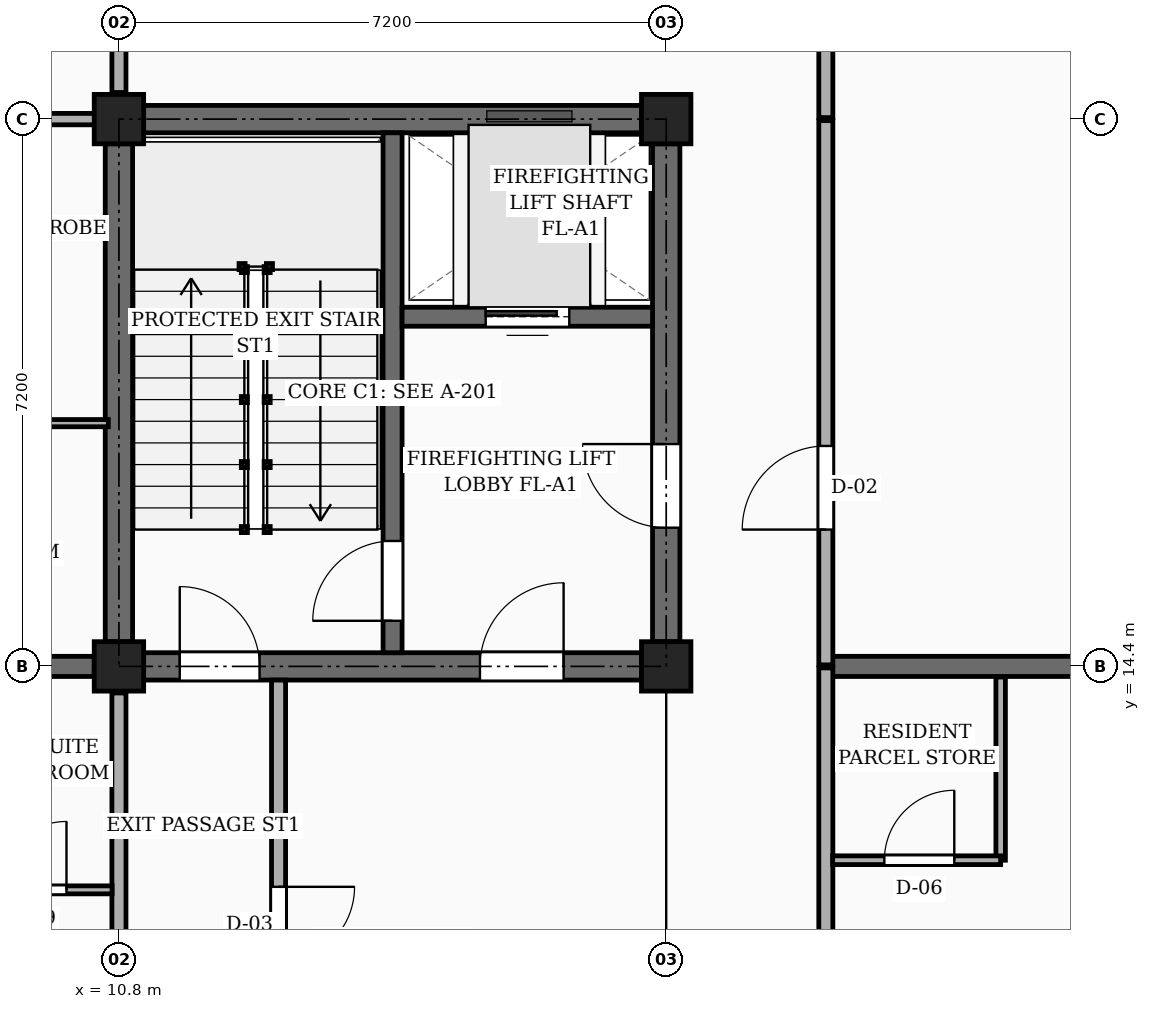
"""IFC4 building model, lengths in metres.
Left out: names, types, materials, properties, quantities, classifications, styles, units other than length and angle.
Written with IfcOpenShell. Run it as: python <this file> out.ifc"""

import sys

from ifc_helpers import new_model, si_unit, direction, frame, frame_2d, origin, origin_2d, place, context, subcontext, project, spatial, rectangle, extrude, element, fill, save


model = new_model("IFC4")
c1 = context("Model", 3, precision=1e-05, world=origin(), true_north=direction((0.0, 1.0)))
c2 = subcontext(c1, "Body", "Model", "MODEL_VIEW")
j1 = project(units=[si_unit("LENGTHUNIT", "METRE"), si_unit("PLANEANGLEUNIT", "RADIAN")], contexts=[c1])
p1 = place(None, origin())
s1 = spatial("IfcSite", under=j1, at=p1, CompositionType="ELEMENT")
p2 = place(p1, origin())
s2 = spatial("IfcBuilding", under=s1, at=p2, CompositionType="ELEMENT")
p3 = place(p2, origin())
s3 = spatial("IfcBuildingStorey", under=s2, at=p3, CompositionType="ELEMENT", Elevation=0.0)
for number, where, z_axis, x_axis in (
    (1, (10.8, 14.4, 0.0), (0.0, 0.0, 1.0), (1.0, 0.0, 0.0)),
    (2, (10.8, 21.6, 0.0), (0.0, 0.0, 1.0), (1.0, 0.0, 0.0)),
    (3, (18.0, 14.4, 0.0), (0.0, 0.0, 1.0), (1.0, 0.0, 0.0)),
    (4, (18.0, 21.6, 0.0), (0.0, 0.0, 1.0), (1.0, 0.0, 0.0)),
):
    element("IfcColumn", number, at=place(p3, frame(where, z_axis=z_axis, x_axis=x_axis)), inside=s3, PredefinedType="COLUMN", context=c2, shape_type="SweptSolid", body=[
        extrude(rectangle(XDim=0.65, YDim=0.65, at=origin_2d()), origin(), (0.0, 0.0, 1.0), 4.5),
    ])
p4 = place(p3, frame((3.9, 14.4, 0.0), z_axis=(0.0, 0.0, 1.0), x_axis=(1.0, 0.0, 0.0)))
e5 = element("IfcWall", 5, at=p4, inside=s3, PredefinedType="SOLIDWALL", context=c2, shape_type="SweptSolid", body=[
    extrude(rectangle(XDim=6.575, YDim=0.265, at=frame_2d((3.288, 0.0))), origin(), (0.0, 0.0, 1.0), 3.52),
])
p5 = place(p4, frame((1.35, 0.0, 0.0)))
e6 = element("IfcOpeningElement", 6, at=p5, cuts=e5, PredefinedType="OPENING", context=c2, shape_type="SweptSolid", body=[
    extrude(rectangle(XDim=0.98, YDim=2.12, at=frame_2d((0.49, 1.06))), frame((0.0, 0.143, 0.0), z_axis=(0.0, -1.0, 0.0), x_axis=(1.0, 0.0, 0.0)), (0.0, 0.0, 1.0), 0.285),
])
p6 = place(p3, frame((20.1, 14.4, 0.0), z_axis=(0.0, 0.0, 1.0), x_axis=(1.0, 0.0, 0.0)))
e7 = element("IfcWall", 7, at=p6, inside=s3, PredefinedType="SOLIDWALL", context=c2, shape_type="SweptSolid", body=[
    extrude(rectangle(XDim=12.0, YDim=0.265, at=frame_2d((6.0, 0.0))), origin(), (0.0, 0.0, 1.0), 3.52),
])
p7 = place(p3, frame((10.8, 14.725, 0.0), z_axis=(0.0, 0.0, 1.0), x_axis=(0.0, 1.0, 0.0)))
e8 = element("IfcWall", 8, at=p7, inside=s3, PredefinedType="SHEAR", context=c2, shape_type="SweptSolid", body=[
    extrude(rectangle(XDim=6.55, YDim=0.36, at=frame_2d((3.275, 0.0))), origin(), (0.0, 0.0, 1.0), 4.22),
])
p8 = place(p3, frame((11.125, 21.6, 0.0), z_axis=(0.0, 0.0, 1.0), x_axis=(1.0, 0.0, 0.0)))
e9 = element("IfcWall", 9, at=p8, inside=s3, PredefinedType="SHEAR", context=c2, shape_type="SweptSolid", body=[
    extrude(rectangle(XDim=6.55, YDim=0.36, at=frame_2d((3.275, 0.0))), origin(), (0.0, 0.0, 1.0), 4.22),
])
p9 = place(p3, frame((18.0, 14.725, 0.0), z_axis=(0.0, 0.0, 1.0), x_axis=(0.0, 1.0, 0.0)))
e10 = element("IfcWall", 10, at=p9, inside=s3, PredefinedType="SHEAR", context=c2, shape_type="SweptSolid", body=[
    extrude(rectangle(XDim=6.55, YDim=0.36, at=frame_2d((3.275, 0.0))), origin(), (0.0, 0.0, 1.0), 4.22),
])
p10 = place(p9, frame((1.5, 0.0, 0.0)))
e11 = element("IfcOpeningElement", 11, at=p10, cuts=e10, PredefinedType="OPENING", context=c2, shape_type="SweptSolid", body=[
    extrude(rectangle(XDim=1.1, YDim=2.15, at=frame_2d((0.55, 1.075))), frame((0.0, 0.19, 0.0), z_axis=(0.0, -1.0, 0.0), x_axis=(1.0, 0.0, 0.0)), (0.0, 0.0, 1.0), 0.38),
])
p11 = place(p3, frame((11.125, 14.4, 0.0), z_axis=(0.0, 0.0, 1.0), x_axis=(1.0, 0.0, 0.0)))
e12 = element("IfcWall", 12, at=p11, inside=s3, PredefinedType="SHEAR", context=c2, shape_type="SweptSolid", body=[
    extrude(rectangle(XDim=6.55, YDim=0.36, at=frame_2d((3.275, 0.0))), origin(), (0.0, 0.0, 1.0), 4.22),
])
p12 = place(p11, frame((4.425, 0.0, 0.0)))
e13 = element("IfcOpeningElement", 13, at=p12, cuts=e12, PredefinedType="OPENING", context=c2, shape_type="SweptSolid", body=[
    extrude(rectangle(XDim=1.1, YDim=2.15, at=frame_2d((0.55, 1.075))), frame((0.0, 0.19, 0.0), z_axis=(0.0, -1.0, 0.0), x_axis=(1.0, 0.0, 0.0)), (0.0, 0.0, 1.0), 0.38),
])
p13 = place(p11, frame((0.475, 0.0, 0.0)))
e14 = element("IfcOpeningElement", 14, at=p13, cuts=e12, PredefinedType="OPENING", context=c2, shape_type="SweptSolid", body=[
    extrude(rectangle(XDim=1.05, YDim=2.15, at=frame_2d((0.525, 1.075))), frame((0.0, 0.19, 0.0), z_axis=(0.0, -1.0, 0.0), x_axis=(1.0, 0.0, 0.0)), (0.0, 0.0, 1.0), 0.38),
])
p14 = place(p3, frame((14.4, 14.58, 0.0), z_axis=(0.0, 0.0, 1.0), x_axis=(0.0, 1.0, 0.0)))
e15 = element("IfcWall", 15, at=p14, inside=s3, PredefinedType="SHEAR", context=c2, shape_type="SweptSolid", body=[
    extrude(rectangle(XDim=6.84, YDim=0.25, at=frame_2d((3.42, 0.0))), origin(), (0.0, 0.0, 1.0), 4.22),
])
p15 = place(p14, frame((0.42, 0.0, 0.0)))
e16 = element("IfcOpeningElement", 16, at=p15, cuts=e15, PredefinedType="OPENING", context=c2, shape_type="SweptSolid", body=[
    extrude(rectangle(XDim=1.05, YDim=2.15, at=frame_2d((0.525, 1.075))), frame((0.0, 0.135, 0.0), z_axis=(0.0, -1.0, 0.0), x_axis=(1.0, 0.0, 0.0)), (0.0, 0.0, 1.0), 0.27),
])
p16 = place(p3, frame((14.525, 19.0, 0.0), z_axis=(0.0, 0.0, 1.0), x_axis=(1.0, 0.0, 0.0)))
e17 = element("IfcWall", 17, at=p16, inside=s3, PredefinedType="SHEAR", context=c2, shape_type="SweptSolid", body=[
    extrude(rectangle(XDim=3.295, YDim=0.25, at=frame_2d((1.647, 0.0))), origin(), (0.0, 0.0, 1.0), 4.22),
])
p17 = place(p16, frame((1.1, 0.0, 0.0)))
e18 = element("IfcOpeningElement", 18, at=p17, cuts=e17, PredefinedType="OPENING", context=c2, shape_type="SweptSolid", body=[
    extrude(rectangle(XDim=1.1, YDim=2.2, at=frame_2d((0.55, 1.1))), frame((0.0, 0.135, 0.0), z_axis=(0.0, -1.0, 0.0), x_axis=(1.0, 0.0, 0.0)), (0.0, 0.0, 1.0), 0.27),
])
p18 = place(p3, frame((20.1, 7.375, 0.0), z_axis=(0.0, 0.0, 1.0), x_axis=(0.0, 1.0, 0.0)))
e19 = element("IfcWall", 19, at=p18, inside=s3, PredefinedType="PARTITIONING", context=c2, shape_type="SweptSolid", body=[
    extrude(rectangle(XDim=7.005, YDim=0.185, at=frame_2d((3.502, 0.0))), origin(), (0.0, 0.0, 1.0), 3.655),
])
p19 = place(p18, frame((1.375, 0.0, 0.0)))
e20 = element("IfcOpeningElement", 20, at=p19, cuts=e19, PredefinedType="OPENING", context=c2, shape_type="SweptSolid", body=[
    extrude(rectangle(XDim=1.1, YDim=2.15, at=frame_2d((0.55, 1.075))), frame((0.0, 0.103, 0.0), z_axis=(0.0, -1.0, 0.0), x_axis=(1.0, 0.0, 0.0)), (0.0, 0.0, 1.0), 0.205),
])
p20 = place(p3, frame((20.1, 14.42, 0.0), z_axis=(0.0, 0.0, 1.0), x_axis=(0.0, 1.0, 0.0)))
e21 = element("IfcWall", 21, at=p20, inside=s3, PredefinedType="PARTITIONING", context=c2, shape_type="SweptSolid", body=[
    extrude(rectangle(XDim=7.16, YDim=0.185, at=frame_2d((3.58, 0.0))), origin(), (0.0, 0.0, 1.0), 3.655),
])
p21 = place(p20, frame((1.78, 0.0, 0.0)))
e22 = element("IfcOpeningElement", 22, at=p21, cuts=e21, PredefinedType="OPENING", context=c2, shape_type="SweptSolid", body=[
    extrude(rectangle(XDim=1.1, YDim=2.15, at=frame_2d((0.55, 1.075))), frame((0.0, 0.103, 0.0), z_axis=(0.0, -1.0, 0.0), x_axis=(1.0, 0.0, 0.0)), (0.0, 0.0, 1.0), 0.205),
])
p22 = place(p3, frame((20.1, 21.62, 0.0), z_axis=(0.0, 0.0, 1.0), x_axis=(0.0, 1.0, 0.0)))
e23 = element("IfcWall", 23, at=p22, inside=s3, PredefinedType="PARTITIONING", context=c2, shape_type="SweptSolid", body=[
    extrude(rectangle(XDim=7.16, YDim=0.185, at=frame_2d((3.58, 0.0))), origin(), (0.0, 0.0, 1.0), 3.655),
])
p23 = place(p22, frame((1.78, 0.0, 0.0)))
e24 = element("IfcOpeningElement", 24, at=p23, cuts=e23, PredefinedType="OPENING", context=c2, shape_type="SweptSolid", body=[
    extrude(rectangle(XDim=1.1, YDim=2.15, at=frame_2d((0.55, 1.075))), frame((0.0, 0.103, 0.0), z_axis=(0.0, -1.0, 0.0), x_axis=(1.0, 0.0, 0.0)), (0.0, 0.0, 1.0), 0.205),
])
p24 = place(p3, frame((10.8, 7.55, 0.0), z_axis=(0.0, 0.0, 1.0), x_axis=(0.0, 1.0, 0.0)))
e25 = element("IfcWall", 25, at=p24, inside=s3, PredefinedType="PARTITIONING", context=c2, shape_type="SweptSolid", body=[
    extrude(rectangle(XDim=6.5, YDim=0.185, at=frame_2d((3.25, 0.0))), origin(), (0.0, 0.0, 1.0), 3.47),
])
p25 = place(p24, frame((1.0, 0.0, 0.0)))
e26 = element("IfcOpeningElement", 26, at=p25, cuts=e25, PredefinedType="OPENING", context=c2, shape_type="SweptSolid", body=[
    extrude(rectangle(XDim=0.94, YDim=2.12, at=frame_2d((0.47, 1.06))), frame((0.0, 0.103, 0.0), z_axis=(0.0, -1.0, 0.0), x_axis=(1.0, 0.0, 0.0)), (0.0, 0.0, 1.0), 0.205),
])
p26 = place(p3, frame((10.8, 21.95, 0.0), z_axis=(0.0, 0.0, 1.0), x_axis=(0.0, 1.0, 0.0)))
e27 = element("IfcWall", 27, at=p26, inside=s3, PredefinedType="PARTITIONING", context=c2, shape_type="SweptSolid", body=[
    extrude(rectangle(XDim=6.5, YDim=0.185, at=frame_2d((3.25, 0.0))), origin(), (0.0, 0.0, 1.0), 3.47),
])
p27 = place(p26, frame((1.0, 0.0, 0.0)))
e28 = element("IfcOpeningElement", 28, at=p27, cuts=e27, PredefinedType="OPENING", context=c2, shape_type="SweptSolid", body=[
    extrude(rectangle(XDim=1.14, YDim=2.18, at=frame_2d((0.57, 1.09))), frame((0.0, 0.103, 0.0), z_axis=(0.0, -1.0, 0.0), x_axis=(1.0, 0.0, 0.0)), (0.0, 0.0, 1.0), 0.205),
])
p28 = place(p3, frame((3.775, 21.6, 0.0), z_axis=(0.0, 0.0, 1.0), x_axis=(1.0, 0.0, 0.0)))
e29 = element("IfcWall", 29, at=p28, inside=s3, PredefinedType="PARTITIONING", context=c2, shape_type="SweptSolid", body=[
    extrude(rectangle(XDim=6.885, YDim=0.15, at=frame_2d((3.442, 0.0))), origin(), (0.0, 0.0, 1.0), 3.27),
])
p29 = place(p3, frame((8.61, 11.46, 0.0), z_axis=(0.0, 0.0, 1.0), x_axis=(1.0, 0.0, 0.0)))
e30 = element("IfcWall", 30, at=p29, inside=s3, PredefinedType="PARTITIONING", context=c2, shape_type="SweptSolid", body=[
    extrude(rectangle(XDim=2.1, YDim=0.105, at=frame_2d((1.05, 0.0))), origin(), (0.0, 0.0, 1.0), 3.655),
])
p30 = place(p29, frame((0.6, 0.0, 0.0)))
e31 = element("IfcOpeningElement", 31, at=p30, cuts=e30, PredefinedType="OPENING", context=c2, shape_type="SweptSolid", body=[
    extrude(rectangle(XDim=0.9, YDim=2.05, at=frame_2d((0.45, 1.025))), frame((0.0, 0.062, 0.0), z_axis=(0.0, -1.0, 0.0), x_axis=(1.0, 0.0, 0.0)), (0.0, 0.0, 1.0), 0.125),
])
p31 = place(p3, frame((22.4, 11.85, 0.0), z_axis=(0.0, 0.0, 1.0), x_axis=(0.0, 1.0, 0.0)))
e32 = element("IfcWall", 32, at=p31, inside=s3, PredefinedType="PARTITIONING", context=c2, shape_type="SweptSolid", body=[
    extrude(rectangle(XDim=2.41, YDim=0.125, at=frame_2d((1.205, 0.0))), origin(), (0.0, 0.0, 1.0), 3.655),
])
p32 = place(p3, frame((20.19, 11.85, 0.0), z_axis=(0.0, 0.0, 1.0), x_axis=(1.0, 0.0, 0.0)))
e33 = element("IfcWall", 33, at=p32, inside=s3, PredefinedType="PARTITIONING", context=c2, shape_type="SweptSolid", body=[
    extrude(rectangle(XDim=2.21, YDim=0.115, at=frame_2d((1.105, 0.0))), origin(), (0.0, 0.0, 1.0), 3.655),
])
p33 = place(p32, frame((0.68, 0.0, 0.0)))
e34 = element("IfcOpeningElement", 34, at=p33, cuts=e33, PredefinedType="OPENING", context=c2, shape_type="SweptSolid", body=[
    extrude(rectangle(XDim=0.92, YDim=2.1, at=frame_2d((0.46, 1.05))), frame((0.0, 0.067, 0.0), z_axis=(0.0, -1.0, 0.0), x_axis=(1.0, 0.0, 0.0)), (0.0, 0.0, 1.0), 0.135),
])
p34 = place(p3, frame((7.27, 17.6, 0.0), z_axis=(0.0, 0.0, 1.0), x_axis=(1.0, 0.0, 0.0)))
e35 = element("IfcWall", 35, at=p34, inside=s3, PredefinedType="PARTITIONING", context=c2, shape_type="SweptSolid", body=[
    extrude(rectangle(XDim=3.39, YDim=0.095, at=frame_2d((1.695, 0.0))), origin(), (0.0, 0.0, 1.0), 3.655),
])
p35 = place(p3, frame((12.9, 14.22, 0.0), z_axis=(0.0, 0.0, 1.0), x_axis=(0.0, -1.0, 0.0)))
e36 = element("IfcWall", 36, at=p35, inside=s3, PredefinedType="PARTITIONING", context=c2, shape_type="SweptSolid", body=[
    extrude(rectangle(XDim=6.86, YDim=0.185, at=frame_2d((3.43, 0.0))), origin(), (0.0, 0.0, 1.0), 3.655),
])
p36 = place(p35, frame((2.72, 0.0, 0.0)))
e37 = element("IfcOpeningElement", 37, at=p36, cuts=e36, PredefinedType="OPENING", context=c2, shape_type="SweptSolid", body=[
    extrude(rectangle(XDim=1.0, YDim=2.15, at=frame_2d((0.5, 1.075))), frame((0.0, 0.103, 0.0), z_axis=(0.0, -1.0, 0.0), x_axis=(1.0, 0.0, 0.0)), (0.0, 0.0, 1.0), 0.205),
])
p37 = place(p10, frame((1.1, 0.0, 0.0), z_axis=(0.0, 0.0, 1.0), x_axis=(-1.0, 0.0, 0.0)))
e38 = element("IfcDoor", 38, at=p37, inside=s3, OperationType="SINGLE_SWING_RIGHT", PredefinedType="DOOR", context=c2, shape_type="SweptSolid", body=[
    extrude(rectangle(XDim=1.1, YDim=2.15, at=frame_2d((0.55, 1.075))), frame((0.0, 0.025, 0.0), z_axis=(0.0, -1.0, 0.0), x_axis=(1.0, 0.0, 0.0)), (0.0, 0.0, 1.0), 0.05),
])
fill(e11, e38)
p38 = place(p12, frame((1.1, 0.0, 0.0), z_axis=(0.0, 0.0, 1.0), x_axis=(-1.0, 0.0, 0.0)))
e39 = element("IfcDoor", 39, at=p38, inside=s3, OperationType="SINGLE_SWING_RIGHT", PredefinedType="DOOR", context=c2, shape_type="SweptSolid", body=[
    extrude(rectangle(XDim=1.1, YDim=2.15, at=frame_2d((0.55, 1.075))), frame((0.0, 0.025, 0.0), z_axis=(0.0, -1.0, 0.0), x_axis=(1.0, 0.0, 0.0)), (0.0, 0.0, 1.0), 0.05),
])
fill(e13, e39)
p39 = place(p15, frame((1.05, 0.0, 0.0), z_axis=(0.0, 0.0, 1.0), x_axis=(-1.0, 0.0, 0.0)))
e40 = element("IfcDoor", 40, at=p39, inside=s3, OperationType="SINGLE_SWING_LEFT", PredefinedType="DOOR", context=c2, shape_type="SweptSolid", body=[
    extrude(rectangle(XDim=1.05, YDim=2.15, at=frame_2d((0.525, 1.075))), frame((0.0, 0.025, 0.0), z_axis=(0.0, -1.0, 0.0), x_axis=(1.0, 0.0, 0.0)), (0.0, 0.0, 1.0), 0.05),
])
fill(e16, e40)
p40 = place(p17, origin())
e41 = element("IfcDoor", 41, at=p40, inside=s3, OperationType="SLIDING_TO_LEFT", PredefinedType="DOOR", context=c2, shape_type="SweptSolid", body=[
    extrude(rectangle(XDim=1.1, YDim=2.2, at=frame_2d((0.55, 1.1))), frame((0.0, 0.025, 0.0), z_axis=(0.0, -1.0, 0.0), x_axis=(1.0, 0.0, 0.0)), (0.0, 0.0, 1.0), 0.05),
])
fill(e18, e41)
p41 = place(p21, origin())
e42 = element("IfcDoor", 42, at=p41, inside=s3, OperationType="SINGLE_SWING_LEFT", PredefinedType="DOOR", context=c2, shape_type="SweptSolid", body=[
    extrude(rectangle(XDim=1.1, YDim=2.15, at=frame_2d((0.55, 1.075))), frame((0.0, 0.025, 0.0), z_axis=(0.0, -1.0, 0.0), x_axis=(1.0, 0.0, 0.0)), (0.0, 0.0, 1.0), 0.05),
])
fill(e22, e42)
p42 = place(p30, origin())
e43 = element("IfcDoor", 43, at=p42, inside=s3, OperationType="SINGLE_SWING_RIGHT", PredefinedType="DOOR", context=c2, shape_type="SweptSolid", body=[
    extrude(rectangle(XDim=0.9, YDim=2.05, at=frame_2d((0.45, 1.025))), frame((0.0, 0.025, 0.0), z_axis=(0.0, -1.0, 0.0), x_axis=(1.0, 0.0, 0.0)), (0.0, 0.0, 1.0), 0.05),
])
fill(e31, e43)
p43 = place(p33, origin())
e44 = element("IfcDoor", 44, at=p43, inside=s3, OperationType="SINGLE_SWING_RIGHT", PredefinedType="DOOR", context=c2, shape_type="SweptSolid", body=[
    extrude(rectangle(XDim=0.92, YDim=2.1, at=frame_2d((0.46, 1.05))), frame((0.0, 0.025, 0.0), z_axis=(0.0, -1.0, 0.0), x_axis=(1.0, 0.0, 0.0)), (0.0, 0.0, 1.0), 0.05),
])
fill(e34, e44)
p44 = place(p13, frame((1.05, 0.0, 0.0), z_axis=(0.0, 0.0, 1.0), x_axis=(-1.0, 0.0, 0.0)))
e45 = element("IfcDoor", 45, at=p44, inside=s3, OperationType="SINGLE_SWING_LEFT", PredefinedType="DOOR", context=c2, shape_type="SweptSolid", body=[
    extrude(rectangle(XDim=1.05, YDim=2.15, at=frame_2d((0.525, 1.075))), frame((0.0, 0.025, 0.0), z_axis=(0.0, -1.0, 0.0), x_axis=(1.0, 0.0, 0.0)), (0.0, 0.0, 1.0), 0.05),
])
fill(e14, e45)
p45 = place(p36, origin())
e46 = element("IfcDoor", 46, at=p45, inside=s3, OperationType="SINGLE_SWING_LEFT", PredefinedType="DOOR", context=c2, shape_type="SweptSolid", body=[
    extrude(rectangle(XDim=1.0, YDim=2.15, at=frame_2d((0.5, 1.075))), frame((0.0, 0.025, 0.0), z_axis=(0.0, -1.0, 0.0), x_axis=(1.0, 0.0, 0.0)), (0.0, 0.0, 1.0), 0.05),
])
fill(e37, e46)
save(model, sys.argv[1])
